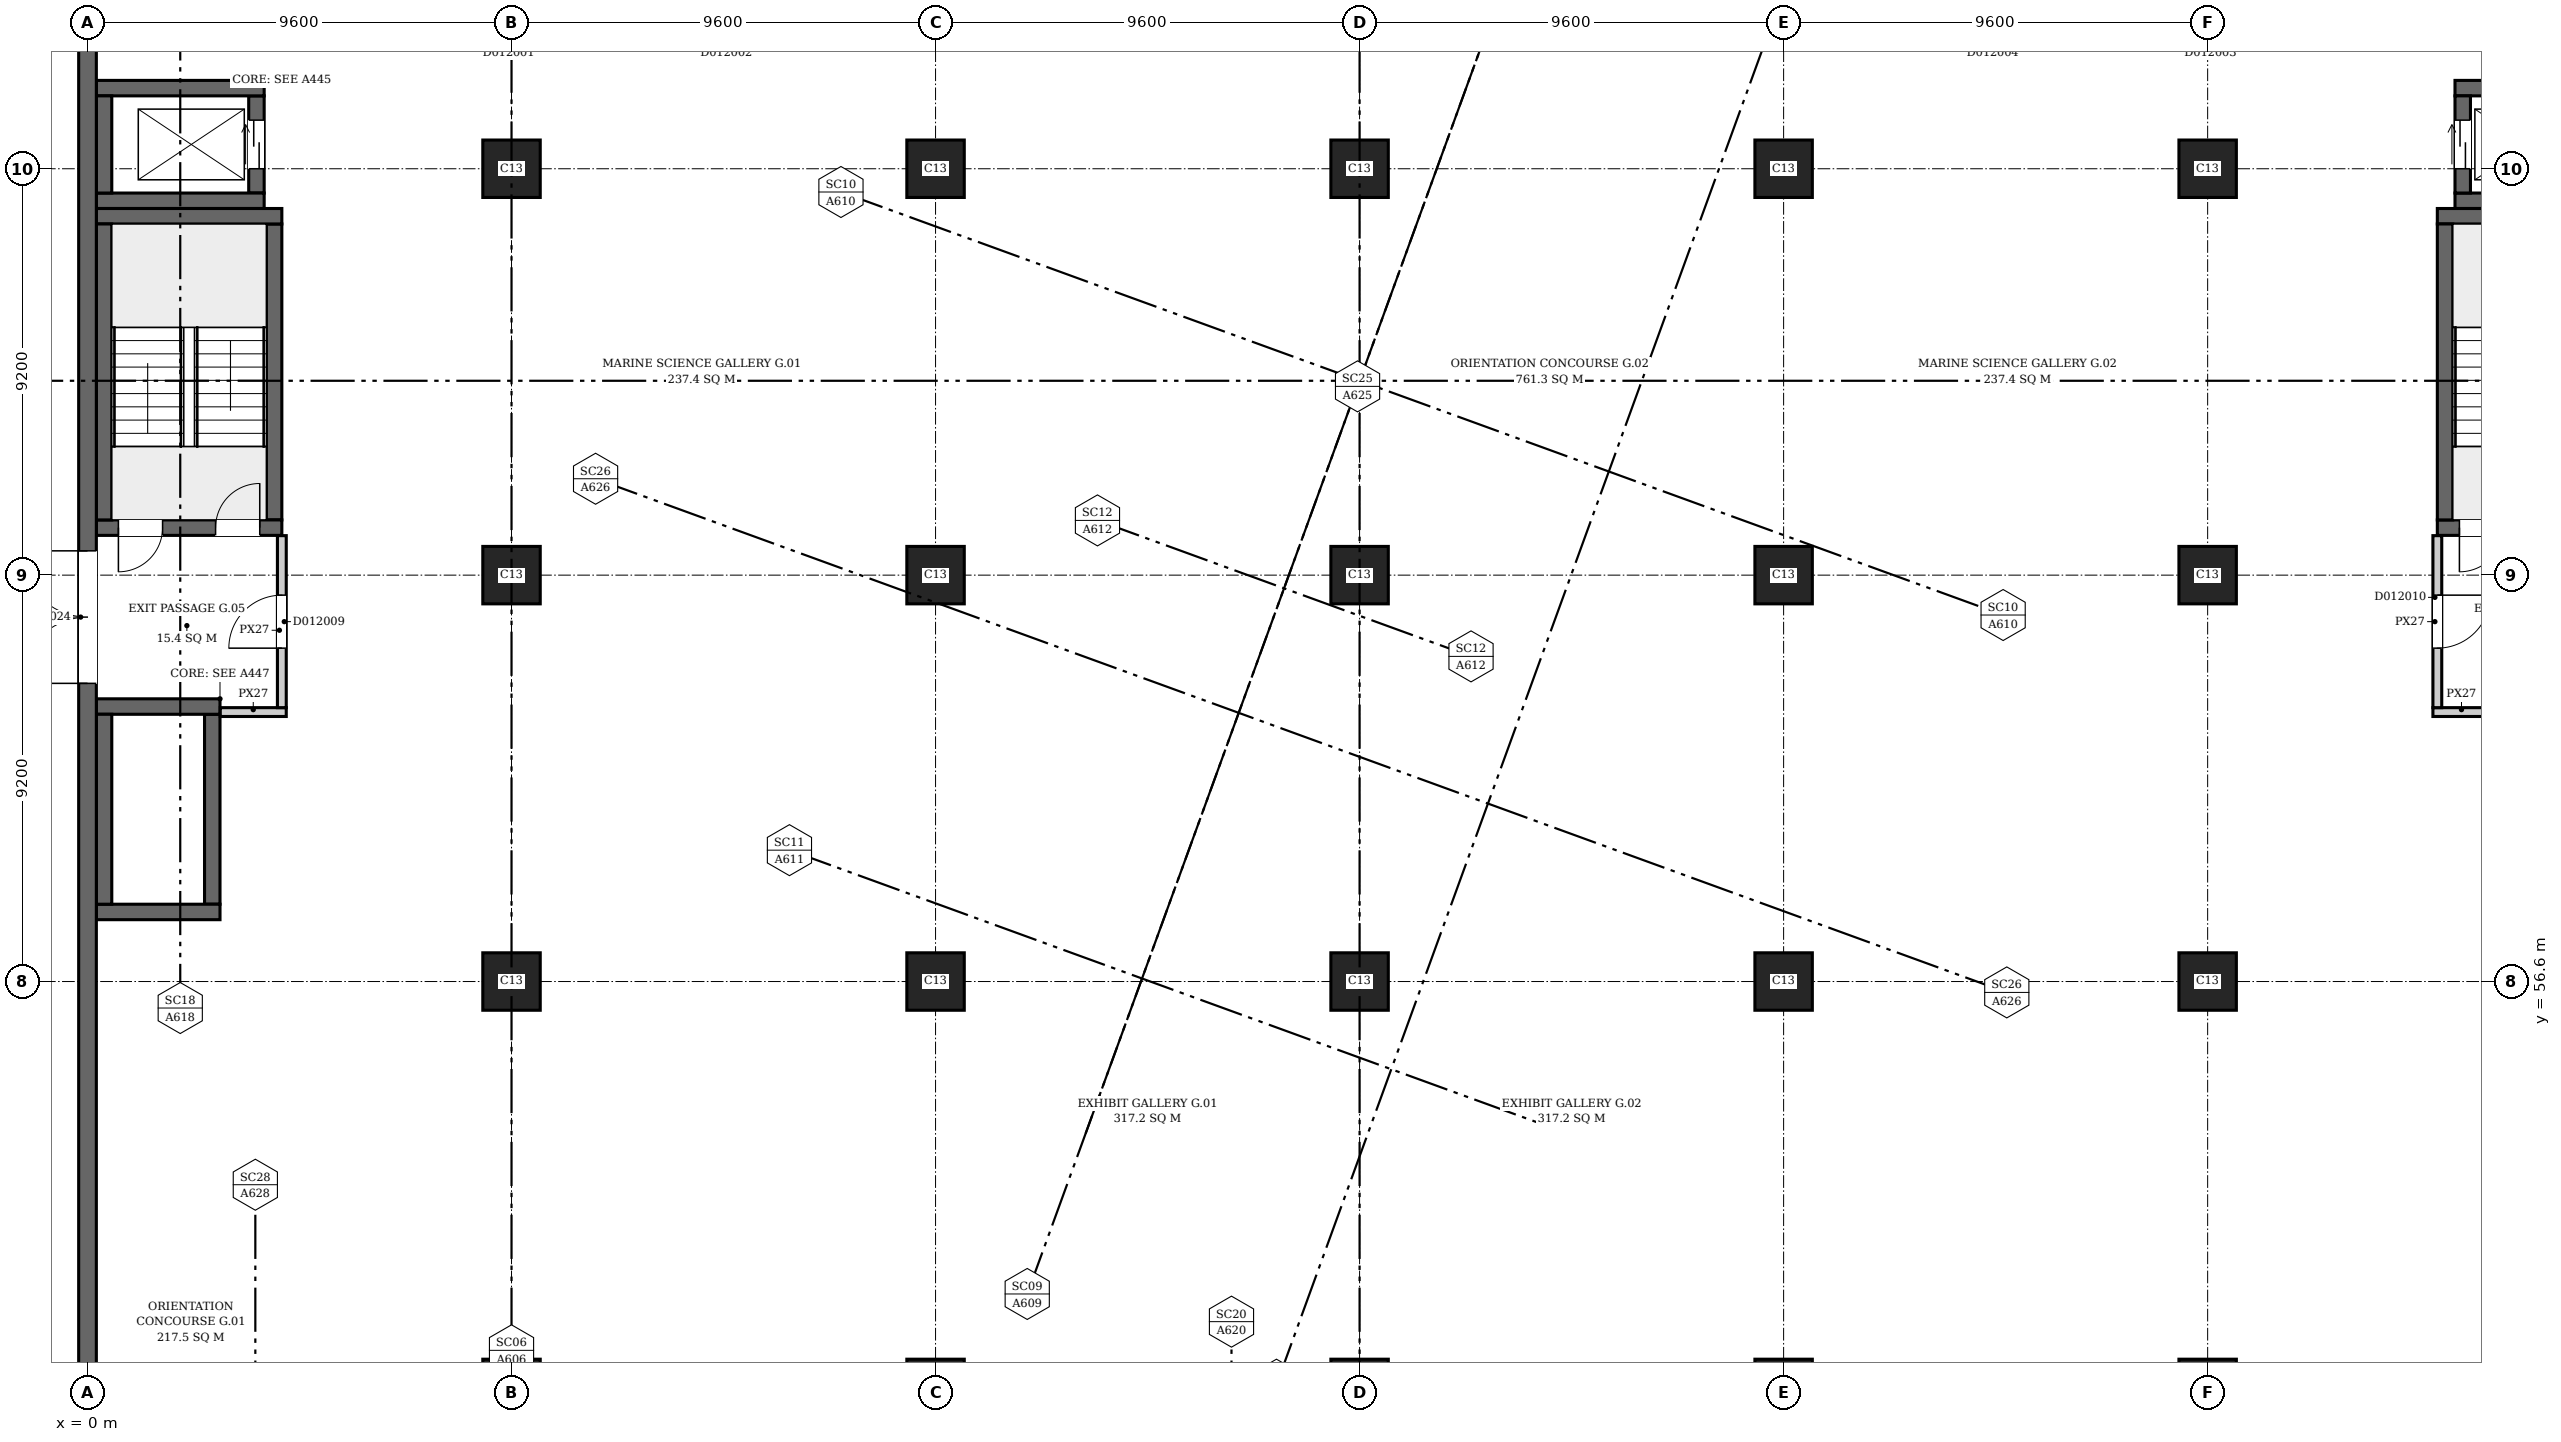
"""IFC4 building model, lengths in metres.
Left out: names, types, materials, properties, quantities, classifications, styles, units other than length and angle.
Written with IfcOpenShell. Run it as: python <this file> out.ifc"""

import sys

from ifc_helpers import new_model, si_unit, direction, frame, frame_2d, origin, origin_2d, place, context, subcontext, project, spatial, rectangle, extrude, element, fill, save


model = new_model("IFC4")
c1 = context("Model", 3, precision=1e-05, world=origin(), true_north=direction((0.0, 1.0)))
c2 = subcontext(c1, "Body", "Model", "MODEL_VIEW")
j1 = project(units=[si_unit("LENGTHUNIT", "METRE"), si_unit("PLANEANGLEUNIT", "RADIAN")], contexts=[c1])
p1 = place(None, origin())
s1 = spatial("IfcSite", under=j1, at=p1, CompositionType="ELEMENT")
p2 = place(p1, origin())
s2 = spatial("IfcBuilding", under=s1, at=p2, CompositionType="ELEMENT")
p3 = place(p2, origin())
s3 = spatial("IfcBuildingStorey", under=s2, at=p3, CompositionType="ELEMENT", Elevation=0.0)
p4 = place(p3, frame((0.0, 46.72, 0.0), z_axis=(0.0, 0.0, 1.0), x_axis=(0.0, 1.0, 0.0)))
e1 = element("IfcWall", 1, at=p4, inside=s3, PredefinedType="SHEAR", context=c2, shape_type="SweptSolid", body=[
    extrude(rectangle(XDim=47.36, YDim=0.4, at=frame_2d((23.68, 0.0))), origin(), (0.0, 0.0, 1.0), 6.5),
])
p5 = place(p4, frame((16.63, 0.0, 0.0)))
e2 = element("IfcOpeningElement", 2, at=p5, cuts=e1, PredefinedType="OPENING", context=c2, shape_type="SweptSolid", body=[
    extrude(rectangle(XDim=3.0, YDim=2.4, at=frame_2d((1.5, 1.2))), frame((0.0, 0.21, 0.0), z_axis=(0.0, -1.0, 0.0), x_axis=(1.0, 0.0, 0.0)), (0.0, 0.0, 1.0), 0.42),
])
p6 = place(p3, frame((0.2, 66.875, 0.0), z_axis=(0.0, 0.0, 1.0), x_axis=(1.0, 0.0, 0.0)))
e3 = element("IfcWall", 3, at=p6, inside=s3, PredefinedType="SHEAR", context=c2, shape_type="SweptSolid", body=[
    extrude(rectangle(XDim=4.2, YDim=0.35, at=frame_2d((2.1, 0.0))), origin(), (0.0, 0.0, 1.0), 6.5),
])
p7 = place(p6, frame((0.5, 0.0, 0.0)))
e4 = element("IfcOpeningElement", 4, at=p7, cuts=e3, PredefinedType="OPENING", context=c2, shape_type="SweptSolid", body=[
    extrude(rectangle(XDim=1.0, YDim=2.1, at=frame_2d((0.5, 1.05))), frame((0.0, 0.185, 0.0), z_axis=(0.0, -1.0, 0.0), x_axis=(1.0, 0.0, 0.0)), (0.0, 0.0, 1.0), 0.37),
])
p8 = place(p6, frame((2.7, 0.0, 0.0)))
e5 = element("IfcOpeningElement", 5, at=p8, cuts=e3, PredefinedType="OPENING", context=c2, shape_type="SweptSolid", body=[
    extrude(rectangle(XDim=1.0, YDim=2.1, at=frame_2d((0.5, 1.05))), frame((0.0, 0.185, 0.0), z_axis=(0.0, -1.0, 0.0), x_axis=(1.0, 0.0, 0.0)), (0.0, 0.0, 1.0), 0.37),
])
p9 = place(p3, frame((0.2, 73.925, 0.0), z_axis=(0.0, 0.0, 1.0), x_axis=(1.0, 0.0, 0.0)))
e6 = element("IfcWall", 6, at=p9, inside=s3, PredefinedType="SHEAR", context=c2, shape_type="SweptSolid", body=[
    extrude(rectangle(XDim=4.2, YDim=0.35, at=frame_2d((2.1, 0.0))), origin(), (0.0, 0.0, 1.0), 6.5),
])
for number, where, z_axis, x_axis in (
    (7, (0.375, 67.05, 0.0), (0.0, 0.0, 1.0), (0.0, 1.0, 0.0)),
    (8, (4.225, 67.05, 0.0), (0.0, 0.0, 1.0), (0.0, 1.0, 0.0)),
):
    element("IfcWall", number, at=place(p3, frame(where, z_axis=z_axis, x_axis=x_axis)), inside=s3, PredefinedType="SHEAR", context=c2, shape_type="SweptSolid", body=[
        extrude(rectangle(XDim=6.7, YDim=0.35, at=frame_2d((3.35, 0.0))), origin(), (0.0, 0.0, 1.0), 6.5),
    ])
p10 = place(p3, frame((53.2, 66.875, 0.0), z_axis=(0.0, 0.0, 1.0), x_axis=(1.0, 0.0, 0.0)))
e9 = element("IfcWall", 9, at=p10, inside=s3, PredefinedType="SHEAR", context=c2, shape_type="SweptSolid", body=[
    extrude(rectangle(XDim=4.2, YDim=0.35, at=frame_2d((2.1, 0.0))), origin(), (0.0, 0.0, 1.0), 6.5),
])
p11 = place(p10, frame((0.5, 0.0, 0.0)))
e10 = element("IfcOpeningElement", 10, at=p11, cuts=e9, PredefinedType="OPENING", context=c2, shape_type="SweptSolid", body=[
    extrude(rectangle(XDim=1.0, YDim=2.1, at=frame_2d((0.5, 1.05))), frame((0.0, 0.185, 0.0), z_axis=(0.0, -1.0, 0.0), x_axis=(1.0, 0.0, 0.0)), (0.0, 0.0, 1.0), 0.37),
])
p12 = place(p10, frame((2.7, 0.0, 0.0)))
e11 = element("IfcOpeningElement", 11, at=p12, cuts=e9, PredefinedType="OPENING", context=c2, shape_type="SweptSolid", body=[
    extrude(rectangle(XDim=1.0, YDim=2.1, at=frame_2d((0.5, 1.05))), frame((0.0, 0.185, 0.0), z_axis=(0.0, -1.0, 0.0), x_axis=(1.0, 0.0, 0.0)), (0.0, 0.0, 1.0), 0.37),
])
p13 = place(p3, frame((53.2, 73.925, 0.0), z_axis=(0.0, 0.0, 1.0), x_axis=(1.0, 0.0, 0.0)))
e12 = element("IfcWall", 12, at=p13, inside=s3, PredefinedType="SHEAR", context=c2, shape_type="SweptSolid", body=[
    extrude(rectangle(XDim=4.2, YDim=0.35, at=frame_2d((2.1, 0.0))), origin(), (0.0, 0.0, 1.0), 6.5),
])
p14 = place(p3, frame((53.375, 67.05, 0.0), z_axis=(0.0, 0.0, 1.0), x_axis=(0.0, 1.0, 0.0)))
e13 = element("IfcWall", 13, at=p14, inside=s3, PredefinedType="SHEAR", context=c2, shape_type="SweptSolid", body=[
    extrude(rectangle(XDim=6.7, YDim=0.35, at=frame_2d((3.35, 0.0))), origin(), (0.0, 0.0, 1.0), 6.5),
])
for number, where, z_axis, x_axis in (
    (14, (0.2, 74.275, 0.0), (0.0, 0.0, 1.0), (1.0, 0.0, 0.0)),
    (15, (0.2, 76.825, 0.0), (0.0, 0.0, 1.0), (1.0, 0.0, 0.0)),
):
    element("IfcWall", number, at=place(p3, frame(where, z_axis=z_axis, x_axis=x_axis)), inside=s3, PredefinedType="SHEAR", context=c2, shape_type="SweptSolid", body=[
        extrude(rectangle(XDim=3.8, YDim=0.35, at=frame_2d((1.9, 0.0))), origin(), (0.0, 0.0, 1.0), 6.5),
    ])
p15 = place(p3, frame((0.375, 74.45, 0.0), z_axis=(0.0, 0.0, 1.0), x_axis=(0.0, 1.0, 0.0)))
e16 = element("IfcWall", 16, at=p15, inside=s3, PredefinedType="SHEAR", context=c2, shape_type="SweptSolid", body=[
    extrude(rectangle(XDim=2.2, YDim=0.35, at=frame_2d((1.1, 0.0))), origin(), (0.0, 0.0, 1.0), 6.5),
])
p16 = place(p3, frame((3.825, 74.45, 0.0), z_axis=(0.0, 0.0, 1.0), x_axis=(0.0, 1.0, 0.0)))
e17 = element("IfcWall", 17, at=p16, inside=s3, PredefinedType="SHEAR", context=c2, shape_type="SweptSolid", body=[
    extrude(rectangle(XDim=2.2, YDim=0.35, at=frame_2d((1.1, 0.0))), origin(), (0.0, 0.0, 1.0), 6.5),
])
p17 = place(p16, frame((0.55, 0.0, 0.0)))
e18 = element("IfcOpeningElement", 18, at=p17, cuts=e17, PredefinedType="OPENING", context=c2, shape_type="SweptSolid", body=[
    extrude(rectangle(XDim=1.1, YDim=2.1, at=frame_2d((0.55, 1.05))), frame((0.0, 0.185, 0.0), z_axis=(0.0, -1.0, 0.0), x_axis=(1.0, 0.0, 0.0)), (0.0, 0.0, 1.0), 0.37),
])
for number, where, z_axis, x_axis in (
    (19, (53.6, 74.275, 0.0), (0.0, 0.0, 1.0), (1.0, 0.0, 0.0)),
    (20, (53.6, 76.825, 0.0), (0.0, 0.0, 1.0), (1.0, 0.0, 0.0)),
):
    element("IfcWall", number, at=place(p3, frame(where, z_axis=z_axis, x_axis=x_axis)), inside=s3, PredefinedType="SHEAR", context=c2, shape_type="SweptSolid", body=[
        extrude(rectangle(XDim=3.8, YDim=0.35, at=frame_2d((1.9, 0.0))), origin(), (0.0, 0.0, 1.0), 6.5),
    ])
p18 = place(p3, frame((53.775, 74.45, 0.0), z_axis=(0.0, 0.0, 1.0), x_axis=(0.0, 1.0, 0.0)))
e21 = element("IfcWall", 21, at=p18, inside=s3, PredefinedType="SHEAR", context=c2, shape_type="SweptSolid", body=[
    extrude(rectangle(XDim=2.2, YDim=0.35, at=frame_2d((1.1, 0.0))), origin(), (0.0, 0.0, 1.0), 6.5),
])
p19 = place(p18, frame((0.55, 0.0, 0.0)))
e22 = element("IfcOpeningElement", 22, at=p19, cuts=e21, PredefinedType="OPENING", context=c2, shape_type="SweptSolid", body=[
    extrude(rectangle(XDim=1.1, YDim=2.1, at=frame_2d((0.55, 1.05))), frame((0.0, 0.185, 0.0), z_axis=(0.0, -1.0, 0.0), x_axis=(1.0, 0.0, 0.0)), (0.0, 0.0, 1.0), 0.37),
])
for number, where, z_axis, x_axis in (
    (23, (0.2, 58.175, 0.0), (0.0, 0.0, 1.0), (1.0, 0.0, 0.0)),
    (24, (0.2, 62.825, 0.0), (0.0, 0.0, 1.0), (1.0, 0.0, 0.0)),
):
    element("IfcWall", number, at=place(p3, frame(where, z_axis=z_axis, x_axis=x_axis)), inside=s3, PredefinedType="SHEAR", context=c2, shape_type="SweptSolid", body=[
        extrude(rectangle(XDim=2.8, YDim=0.35, at=frame_2d((1.4, 0.0))), origin(), (0.0, 0.0, 1.0), 6.5),
    ])
for number, where, z_axis, x_axis in (
    (25, (0.375, 58.35, 0.0), (0.0, 0.0, 1.0), (0.0, 1.0, 0.0)),
    (26, (2.825, 58.35, 0.0), (0.0, 0.0, 1.0), (0.0, 1.0, 0.0)),
):
    element("IfcWall", number, at=place(p3, frame(where, z_axis=z_axis, x_axis=x_axis)), inside=s3, PredefinedType="SHEAR", context=c2, shape_type="SweptSolid", body=[
        extrude(rectangle(XDim=4.3, YDim=0.35, at=frame_2d((2.15, 0.0))), origin(), (0.0, 0.0, 1.0), 6.5),
    ])
for number, where, z_axis, x_axis in (
    (27, (9.6, 47.4, 0.0), (0.0, 0.0, 1.0), (1.0, 0.0, 0.0)),
    (28, (19.2, 47.4, 0.0), (0.0, 0.0, 1.0), (1.0, 0.0, 0.0)),
    (29, (28.8, 47.4, 0.0), (0.0, 0.0, 1.0), (1.0, 0.0, 0.0)),
    (30, (38.4, 47.4, 0.0), (0.0, 0.0, 1.0), (1.0, 0.0, 0.0)),
    (31, (48.0, 47.4, 0.0), (0.0, 0.0, 1.0), (1.0, 0.0, 0.0)),
    (32, (9.6, 56.6, 0.0), (0.0, 0.0, 1.0), (1.0, 0.0, 0.0)),
    (33, (19.2, 56.6, 0.0), (0.0, 0.0, 1.0), (1.0, 0.0, 0.0)),
    (34, (28.8, 56.6, 0.0), (0.0, 0.0, 1.0), (1.0, 0.0, 0.0)),
    (35, (38.4, 56.6, 0.0), (0.0, 0.0, 1.0), (1.0, 0.0, 0.0)),
    (36, (48.0, 56.6, 0.0), (0.0, 0.0, 1.0), (1.0, 0.0, 0.0)),
    (37, (9.6, 65.8, 0.0), (0.0, 0.0, 1.0), (1.0, 0.0, 0.0)),
    (38, (19.2, 65.8, 0.0), (0.0, 0.0, 1.0), (1.0, 0.0, 0.0)),
    (39, (28.8, 65.8, 0.0), (0.0, 0.0, 1.0), (1.0, 0.0, 0.0)),
    (40, (38.4, 65.8, 0.0), (0.0, 0.0, 1.0), (1.0, 0.0, 0.0)),
    (41, (48.0, 65.8, 0.0), (0.0, 0.0, 1.0), (1.0, 0.0, 0.0)),
    (42, (9.6, 75.0, 0.0), (0.0, 0.0, 1.0), (1.0, 0.0, 0.0)),
    (43, (19.2, 75.0, 0.0), (0.0, 0.0, 1.0), (1.0, 0.0, 0.0)),
    (44, (28.8, 75.0, 0.0), (0.0, 0.0, 1.0), (1.0, 0.0, 0.0)),
    (45, (38.4, 75.0, 0.0), (0.0, 0.0, 1.0), (1.0, 0.0, 0.0)),
    (46, (48.0, 75.0, 0.0), (0.0, 0.0, 1.0), (1.0, 0.0, 0.0)),
):
    element("IfcColumn", number, at=place(p3, frame(where, z_axis=z_axis, x_axis=x_axis)), inside=s3, PredefinedType="COLUMN", context=c2, shape_type="SweptSolid", body=[
        extrude(rectangle(XDim=1.3, YDim=1.3, at=origin_2d()), origin(), (0.0, 0.0, 1.0), 6.5),
    ])
p20 = place(p3, frame((3.006, 62.7, 0.0), z_axis=(0.0, 0.0, 1.0), x_axis=(1.0, 0.0, 0.0)))
e47 = element("IfcWall", 47, at=p20, inside=s3, PredefinedType="PARTITIONING", context=c2, shape_type="SweptSolid", body=[
    extrude(rectangle(XDim=1.494, YDim=0.2, at=frame_2d((0.747, 0.0))), origin(), (0.0, 0.0, 1.0), 6.05),
])
p21 = place(p3, frame((4.4, 62.8, 0.0), z_axis=(0.0, 0.0, 1.0), x_axis=(0.0, 1.0, 0.0)))
e48 = element("IfcWall", 48, at=p21, inside=s3, PredefinedType="PARTITIONING", context=c2, shape_type="SweptSolid", body=[
    extrude(rectangle(XDim=3.894, YDim=0.2, at=frame_2d((1.947, 0.0))), origin(), (0.0, 0.0, 1.0), 6.05),
])
p22 = place(p21, frame((1.347, 0.0, 0.0)))
e49 = element("IfcOpeningElement", 49, at=p22, cuts=e48, PredefinedType="OPENING", context=c2, shape_type="SweptSolid", body=[
    extrude(rectangle(XDim=1.2, YDim=2.1, at=frame_2d((0.6, 1.05))), frame((0.0, 0.11, 0.0), z_axis=(0.0, -1.0, 0.0), x_axis=(1.0, 0.0, 0.0)), (0.0, 0.0, 1.0), 0.22),
])
p23 = place(p3, frame((53.1, 62.7, 0.0), z_axis=(0.0, 0.0, 1.0), x_axis=(1.0, 0.0, 0.0)))
e50 = element("IfcWall", 50, at=p23, inside=s3, PredefinedType="PARTITIONING", context=c2, shape_type="SweptSolid", body=[
    extrude(rectangle(XDim=1.294, YDim=0.2, at=frame_2d((0.647, 0.0))), origin(), (0.0, 0.0, 1.0), 6.05),
])
p24 = place(p3, frame((53.2, 62.8, 0.0), z_axis=(0.0, 0.0, 1.0), x_axis=(0.0, 1.0, 0.0)))
e51 = element("IfcWall", 51, at=p24, inside=s3, PredefinedType="PARTITIONING", context=c2, shape_type="SweptSolid", body=[
    extrude(rectangle(XDim=3.894, YDim=0.2, at=frame_2d((1.947, 0.0))), origin(), (0.0, 0.0, 1.0), 6.05),
])
p25 = place(p24, frame((1.347, 0.0, 0.0)))
e52 = element("IfcOpeningElement", 52, at=p25, cuts=e51, PredefinedType="OPENING", context=c2, shape_type="SweptSolid", body=[
    extrude(rectangle(XDim=1.2, YDim=2.1, at=frame_2d((0.6, 1.05))), frame((0.0, 0.11, 0.0), z_axis=(0.0, -1.0, 0.0), x_axis=(1.0, 0.0, 0.0)), (0.0, 0.0, 1.0), 0.22),
])
p26 = place(p5, origin())
e53 = element("IfcDoor", 53, at=p26, inside=s3, OperationType="DOUBLE_DOOR_SINGLE_SWING", PredefinedType="DOOR", context=c2, shape_type="SweptSolid", body=[
    extrude(rectangle(XDim=3.0, YDim=2.4, at=frame_2d((1.5, 1.2))), frame((0.0, 0.025, 0.0), z_axis=(0.0, -1.0, 0.0), x_axis=(1.0, 0.0, 0.0)), (0.0, 0.0, 1.0), 0.05),
])
fill(e2, e53)
p27 = place(p7, origin())
e54 = element("IfcDoor", 54, at=p27, inside=s3, OperationType="SINGLE_SWING_LEFT", PredefinedType="DOOR", context=c2, shape_type="SweptSolid", body=[
    extrude(rectangle(XDim=1.0, YDim=2.1, at=frame_2d((0.5, 1.05))), frame((0.0, 0.025, 0.0), z_axis=(0.0, -1.0, 0.0), x_axis=(1.0, 0.0, 0.0)), (0.0, 0.0, 1.0), 0.05),
])
fill(e4, e54)
p28 = place(p8, origin())
e55 = element("IfcDoor", 55, at=p28, inside=s3, OperationType="SINGLE_SWING_RIGHT", PredefinedType="DOOR", context=c2, shape_type="SweptSolid", body=[
    extrude(rectangle(XDim=1.0, YDim=2.1, at=frame_2d((0.5, 1.05))), frame((0.0, 0.025, 0.0), z_axis=(0.0, -1.0, 0.0), x_axis=(1.0, 0.0, 0.0)), (0.0, 0.0, 1.0), 0.05),
])
fill(e5, e55)
p29 = place(p11, origin())
e56 = element("IfcDoor", 56, at=p29, inside=s3, OperationType="SINGLE_SWING_LEFT", PredefinedType="DOOR", context=c2, shape_type="SweptSolid", body=[
    extrude(rectangle(XDim=1.0, YDim=2.1, at=frame_2d((0.5, 1.05))), frame((0.0, 0.025, 0.0), z_axis=(0.0, -1.0, 0.0), x_axis=(1.0, 0.0, 0.0)), (0.0, 0.0, 1.0), 0.05),
])
fill(e10, e56)
p30 = place(p17, origin())
e57 = element("IfcDoor", 57, at=p30, inside=s3, OperationType="DOUBLE_DOOR_SLIDING", PredefinedType="DOOR", context=c2, shape_type="SweptSolid", body=[
    extrude(rectangle(XDim=1.1, YDim=2.1, at=frame_2d((0.55, 1.05))), frame((0.0, 0.025, 0.0), z_axis=(0.0, -1.0, 0.0), x_axis=(1.0, 0.0, 0.0)), (0.0, 0.0, 1.0), 0.05),
])
fill(e18, e57)
p31 = place(p19, origin())
e58 = element("IfcDoor", 58, at=p31, inside=s3, OperationType="DOUBLE_DOOR_SLIDING", PredefinedType="DOOR", context=c2, shape_type="SweptSolid", body=[
    extrude(rectangle(XDim=1.1, YDim=2.1, at=frame_2d((0.55, 1.05))), frame((0.0, 0.025, 0.0), z_axis=(0.0, -1.0, 0.0), x_axis=(1.0, 0.0, 0.0)), (0.0, 0.0, 1.0), 0.05),
])
fill(e22, e58)
p32 = place(p22, origin())
e59 = element("IfcDoor", 59, at=p32, inside=s3, OperationType="SINGLE_SWING_LEFT", PredefinedType="DOOR", context=c2, shape_type="SweptSolid", body=[
    extrude(rectangle(XDim=1.2, YDim=2.1, at=frame_2d((0.6, 1.05))), frame((0.0, 0.025, 0.0), z_axis=(0.0, -1.0, 0.0), x_axis=(1.0, 0.0, 0.0)), (0.0, 0.0, 1.0), 0.05),
])
fill(e49, e59)
p33 = place(p25, origin())
e60 = element("IfcDoor", 60, at=p33, inside=s3, OperationType="SINGLE_SWING_RIGHT", PredefinedType="DOOR", context=c2, shape_type="SweptSolid", body=[
    extrude(rectangle(XDim=1.2, YDim=2.1, at=frame_2d((0.6, 1.05))), frame((0.0, 0.025, 0.0), z_axis=(0.0, -1.0, 0.0), x_axis=(1.0, 0.0, 0.0)), (0.0, 0.0, 1.0), 0.05),
])
fill(e52, e60)
save(model, sys.argv[1])
